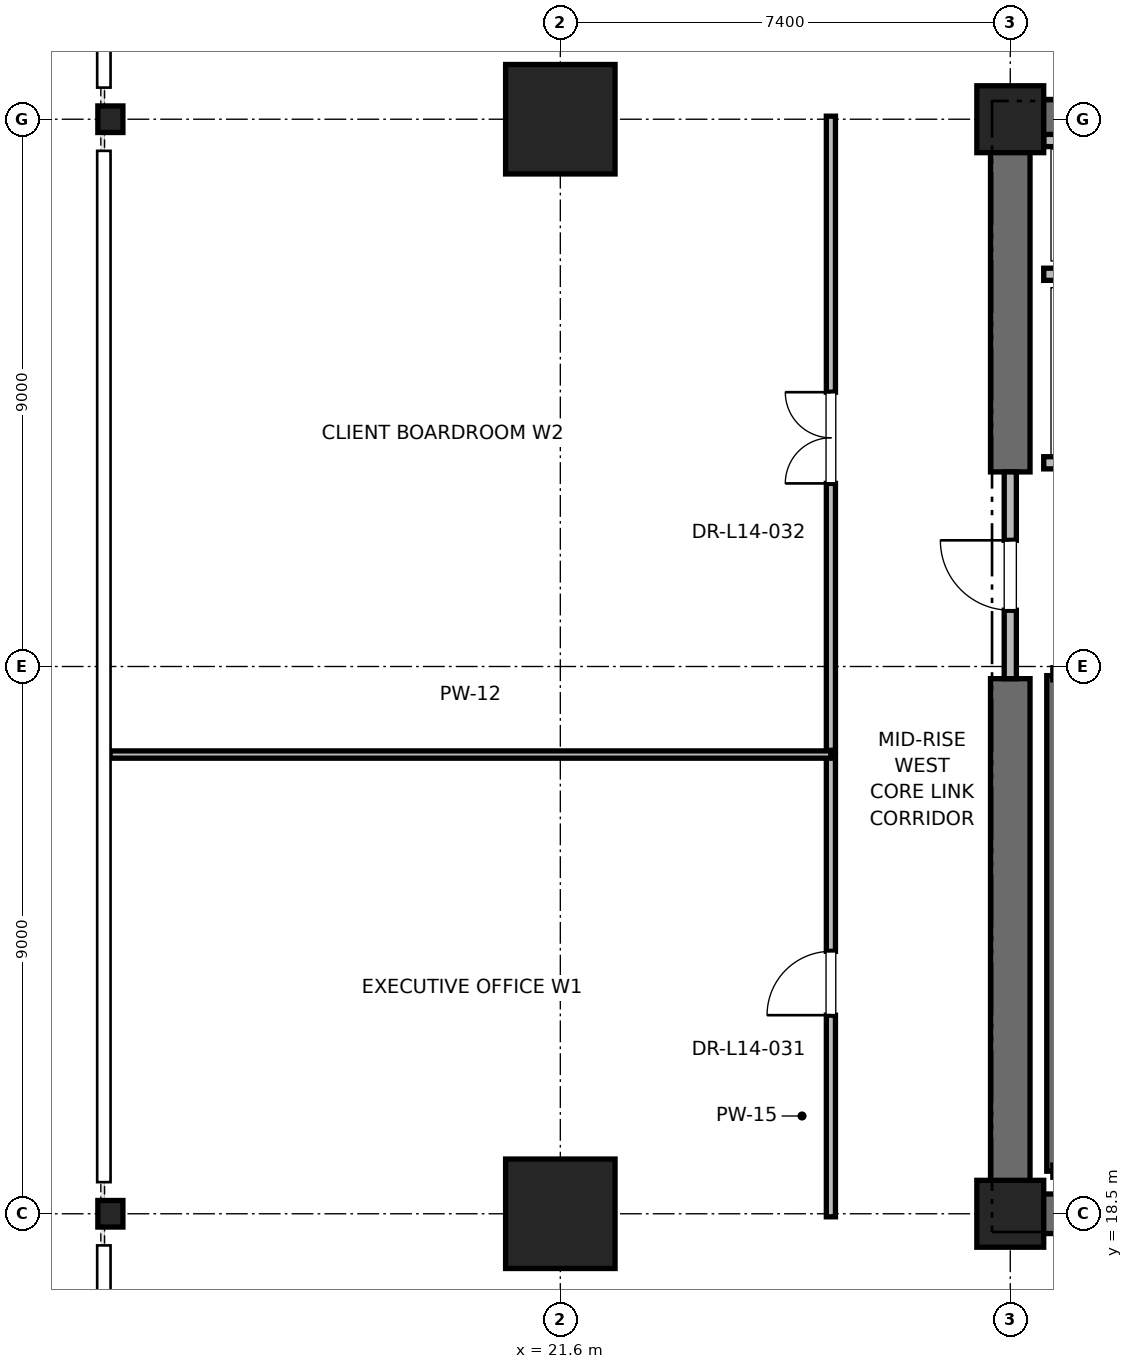
"""IFC4 building model, lengths in metres.
Left out: names, types, materials, properties, quantities, classifications, styles, units other than length and angle.
Written with IfcOpenShell. Run it as: python <this file> out.ifc"""

import sys

from ifc_helpers import new_model, si_unit, direction, frame, frame_2d, origin, origin_2d, place, context, subcontext, project, spatial, rectangle, i_section, extrude, element, fill, save


model = new_model("IFC4")
c1 = context("Model", 3, precision=1e-05, world=origin(), true_north=direction((0.0, 1.0)))
c2 = subcontext(c1, "Body", "Model", "MODEL_VIEW")
j1 = project(units=[si_unit("LENGTHUNIT", "METRE"), si_unit("PLANEANGLEUNIT", "RADIAN")], contexts=[c1])
p1 = place(None, origin())
s1 = spatial("IfcSite", under=j1, at=p1, CompositionType="ELEMENT")
p2 = place(p1, origin())
s2 = spatial("IfcBuilding", under=s1, at=p2, CompositionType="ELEMENT")
p3 = place(p2, frame((0.0, 0.0, 63.6)))
s3 = spatial("IfcBuildingStorey", under=s2, at=p3, CompositionType="ELEMENT", Elevation=63.6)
for number, where, z_axis, x_axis in (
    (1, (21.6, 18.5, 0.0), (0.0, 0.0, 1.0), (1.0, 0.0, 0.0)),
    (2, (21.6, 36.5, 0.0), (0.0, 0.0, 1.0), (1.0, 0.0, 0.0)),
):
    element("IfcColumn", number, at=place(p3, frame(where, z_axis=z_axis, x_axis=x_axis)), inside=s3, PredefinedType="COLUMN", context=c2, shape_type="SweptSolid", body=[
        extrude(rectangle(XDim=1.8, YDim=1.8, at=origin_2d()), origin(), (0.0, 0.0, 1.0), 4.0),
    ])
for number, where, z_axis, x_axis in (
    (3, (14.2, 18.5, 0.0), (0.0, 0.0, 1.0), (1.0, 0.0, 0.0)),
    (4, (14.2, 36.5, 0.0), (0.0, 0.0, 1.0), (1.0, 0.0, 0.0)),
):
    element("IfcColumn", number, at=place(p3, frame(where, z_axis=z_axis, x_axis=x_axis)), inside=s3, PredefinedType="COLUMN", context=c2, shape_type="SweptSolid", body=[
        extrude(i_section(OverallWidth=0.412, OverallDepth=0.437, WebThickness=0.036, FlangeThickness=0.058, FilletRadius=0.015, at=origin_2d()), origin(), (0.0, 0.0, 1.0), 4.0),
    ])
for number, where, z_axis, x_axis in (
    (5, (29.0, 18.5, 0.0), (0.0, 0.0, 1.0), (1.0, 0.0, 0.0)),
    (6, (29.0, 36.5, 0.0), (0.0, 0.0, 1.0), (1.0, 0.0, 0.0)),
):
    element("IfcColumn", number, at=place(p3, frame(where, z_axis=z_axis, x_axis=x_axis)), inside=s3, PredefinedType="PILASTER", context=c2, shape_type="SweptSolid", body=[
        extrude(rectangle(XDim=1.1, YDim=1.1, at=origin_2d()), origin(), (0.0, 0.0, 1.0), 4.0),
    ])
p4 = place(p3, frame((29.0, 18.5, 0.0), z_axis=(0.0, 0.0, 1.0), x_axis=(1.0, 0.0, 0.0)))
e7 = element("IfcWall", 7, at=p4, inside=s3, PredefinedType="SHEAR", context=c2, shape_type="SweptSolid", body=[
    extrude(rectangle(XDim=9.2, YDim=0.65, at=frame_2d((4.6, 0.0))), origin(), (0.0, 0.0, 1.0), 3.76),
])
p5 = place(p3, frame((29.0, 36.5, 0.0), z_axis=(0.0, 0.0, 1.0), x_axis=(1.0, 0.0, 0.0)))
e8 = element("IfcWall", 8, at=p5, inside=s3, PredefinedType="SHEAR", context=c2, shape_type="SweptSolid", body=[
    extrude(rectangle(XDim=5.8, YDim=0.65, at=frame_2d((2.9, 0.0))), origin(), (0.0, 0.0, 1.0), 3.76),
])
p6 = place(p3, frame((29.0, 18.5, 0.0), z_axis=(0.0, 0.0, 1.0), x_axis=(0.0, 1.0, 0.0)))
e9 = element("IfcWall", 9, at=p6, inside=s3, PredefinedType="SHEAR", context=c2, shape_type="SweptSolid", body=[
    extrude(rectangle(XDim=8.8, YDim=0.65, at=frame_2d((4.4, 0.0))), origin(), (0.0, 0.0, 1.0), 3.76),
])
p7 = place(p3, frame((29.0, 30.7, 0.0), z_axis=(0.0, 0.0, 1.0), x_axis=(0.0, 1.0, 0.0)))
e10 = element("IfcWall", 10, at=p7, inside=s3, PredefinedType="SHEAR", context=c2, shape_type="SweptSolid", body=[
    extrude(rectangle(XDim=5.8, YDim=0.65, at=frame_2d((2.9, 0.0))), origin(), (0.0, 0.0, 1.0), 3.76),
])
p8 = place(p3, frame((29.7, 19.2, 0.0), z_axis=(0.0, 0.0, 1.0), x_axis=(0.0, 1.0, 0.0)))
e11 = element("IfcWall", 11, at=p8, inside=s3, PredefinedType="SOLIDWALL", context=c2, shape_type="SweptSolid", body=[
    extrude(rectangle(XDim=8.15, YDim=0.2, at=frame_2d((4.075, 0.0))), origin(), (0.0, 0.0, 1.0), 3.76),
])
p9 = place(p3, frame((29.0, 27.3, 0.0), z_axis=(0.0, 0.0, 1.0), x_axis=(0.0, 1.0, 0.0)))
e12 = element("IfcWall", 12, at=p9, inside=s3, PredefinedType="PARTITIONING", context=c2, shape_type="SweptSolid", body=[
    extrude(rectangle(XDim=3.4, YDim=0.2, at=frame_2d((1.7, 0.0))), origin(), (0.0, 0.0, 1.0), 2.54),
])
p10 = place(p9, frame((1.125, 0.0, 0.0)))
e13 = element("IfcOpeningElement", 13, at=p10, cuts=e12, PredefinedType="OPENING", context=c2, shape_type="SweptSolid", body=[
    extrude(rectangle(XDim=1.15, YDim=2.2, at=frame_2d((0.575, 1.1))), frame((0.0, 0.1, 0.0), z_axis=(0.0, -1.0, 0.0), x_axis=(1.0, 0.0, 0.0)), (0.0, 0.0, 1.0), 0.2),
])
p11 = place(p3, frame((29.55, 30.85, 0.0), z_axis=(0.0, 0.0, 1.0), x_axis=(1.0, 0.0, 0.0)))
e14 = element("IfcWall", 14, at=p11, inside=s3, PredefinedType="SOLIDWALL", context=c2, shape_type="SweptSolid", body=[
    extrude(rectangle(XDim=2.6, YDim=0.2, at=frame_2d((1.3, 0.0))), origin(), (0.0, 0.0, 1.0), 2.54),
])
p12 = place(p11, frame((0.75, 0.0, 0.0)))
e15 = element("IfcOpeningElement", 15, at=p12, cuts=e14, PredefinedType="OPENING", context=c2, shape_type="SweptSolid", body=[
    extrude(rectangle(XDim=1.1, YDim=2.2, at=frame_2d((0.55, 1.1))), frame((0.0, 0.1, 0.0), z_axis=(0.0, -1.0, 0.0), x_axis=(1.0, 0.0, 0.0)), (0.0, 0.0, 1.0), 0.2),
])
p13 = place(p3, frame((29.55, 33.95, 0.0), z_axis=(0.0, 0.0, 1.0), x_axis=(1.0, 0.0, 0.0)))
e16 = element("IfcWall", 16, at=p13, inside=s3, PredefinedType="SOLIDWALL", context=c2, shape_type="SweptSolid", body=[
    extrude(rectangle(XDim=2.8, YDim=0.2, at=frame_2d((1.4, 0.0))), origin(), (0.0, 0.0, 1.0), 3.76),
])
p14 = place(p3, frame((32.35, 36.15, 0.0), z_axis=(0.0, 0.0, 1.0), x_axis=(-1.0, 0.0, 0.0)))
e17 = element("IfcWall", 17, at=p14, inside=s3, PredefinedType="SOLIDWALL", context=c2, shape_type="SweptSolid", body=[
    extrude(rectangle(XDim=2.8, YDim=0.2, at=frame_2d((1.4, 0.0))), origin(), (0.0, 0.0, 1.0), 2.889),
])
p15 = place(p3, frame((26.05, 18.45, 0.0), z_axis=(0.0, 0.0, 1.0), x_axis=(0.0, 1.0, 0.0)))
e18 = element("IfcWall", 18, at=p15, inside=s3, PredefinedType="PARTITIONING", context=c2, shape_type="SweptSolid", body=[
    extrude(rectangle(XDim=7.602, YDim=0.15, at=frame_2d((3.801, 0.0))), origin(), (0.0, 0.0, 1.0), 2.85),
])
p16 = place(p15, frame((3.316, 0.0, 0.0)))
e19 = element("IfcOpeningElement", 19, at=p16, cuts=e18, PredefinedType="OPENING", context=c2, shape_type="SweptSolid", body=[
    extrude(rectangle(XDim=1.05, YDim=2.2, at=frame_2d((0.525, 1.1))), frame((0.0, 0.075, 0.0), z_axis=(0.0, -1.0, 0.0), x_axis=(1.0, 0.0, 0.0)), (0.0, 0.0, 1.0), 0.15),
])
p17 = place(p3, frame((14.193, 26.052, 0.0), z_axis=(0.0, 0.0, 1.0), x_axis=(1.0, 0.0, 0.0)))
e20 = element("IfcWall", 20, at=p17, inside=s3, PredefinedType="PARTITIONING", context=c2, shape_type="SweptSolid", body=[
    extrude(rectangle(XDim=11.857, YDim=0.12, at=frame_2d((5.929, 0.0))), origin(), (0.0, 0.0, 1.0), 2.85),
])
p18 = place(p3, frame((26.05, 26.122, 0.0), z_axis=(0.0, 0.0, 1.0), x_axis=(0.0, 1.0, 0.0)))
e21 = element("IfcWall", 21, at=p18, inside=s3, PredefinedType="PARTITIONING", context=c2, shape_type="SweptSolid", body=[
    extrude(rectangle(XDim=10.428, YDim=0.15, at=frame_2d((5.214, 0.0))), origin(), (0.0, 0.0, 1.0), 2.85),
])
p19 = place(p18, frame((4.389, 0.0, 0.0)))
e22 = element("IfcOpeningElement", 22, at=p19, cuts=e21, PredefinedType="OPENING", context=c2, shape_type="SweptSolid", body=[
    extrude(rectangle(XDim=1.5, YDim=2.25, at=frame_2d((0.75, 1.125))), frame((0.0, 0.075, 0.0), z_axis=(0.0, -1.0, 0.0), x_axis=(1.0, 0.0, 0.0)), (0.0, 0.0, 1.0), 0.15),
])
p20 = place(p10, origin())
e23 = element("IfcDoor", 23, at=p20, inside=s3, OperationType="SINGLE_SWING_RIGHT", PredefinedType="DOOR", context=c2, shape_type="SweptSolid", body=[
    extrude(rectangle(XDim=1.15, YDim=2.2, at=frame_2d((0.575, 1.1))), frame((0.0, 0.025, 0.0), z_axis=(0.0, -1.0, 0.0), x_axis=(1.0, 0.0, 0.0)), (0.0, 0.0, 1.0), 0.05),
])
fill(e13, e23)
p21 = place(p16, origin())
e24 = element("IfcDoor", 24, at=p21, inside=s3, OperationType="SINGLE_SWING_LEFT", PredefinedType="DOOR", context=c2, shape_type="SweptSolid", body=[
    extrude(rectangle(XDim=1.05, YDim=2.2, at=frame_2d((0.525, 1.1))), frame((0.0, 0.025, 0.0), z_axis=(0.0, -1.0, 0.0), x_axis=(1.0, 0.0, 0.0)), (0.0, 0.0, 1.0), 0.05),
])
fill(e19, e24)
p22 = place(p19, origin())
e25 = element("IfcDoor", 25, at=p22, inside=s3, OperationType="DOUBLE_DOOR_SINGLE_SWING", PredefinedType="DOOR", context=c2, shape_type="SweptSolid", body=[
    extrude(rectangle(XDim=1.5, YDim=2.25, at=frame_2d((0.75, 1.125))), frame((0.0, 0.025, 0.0), z_axis=(0.0, -1.0, 0.0), x_axis=(1.0, 0.0, 0.0)), (0.0, 0.0, 1.0), 0.05),
])
fill(e22, e25)
save(model, sys.argv[1])
